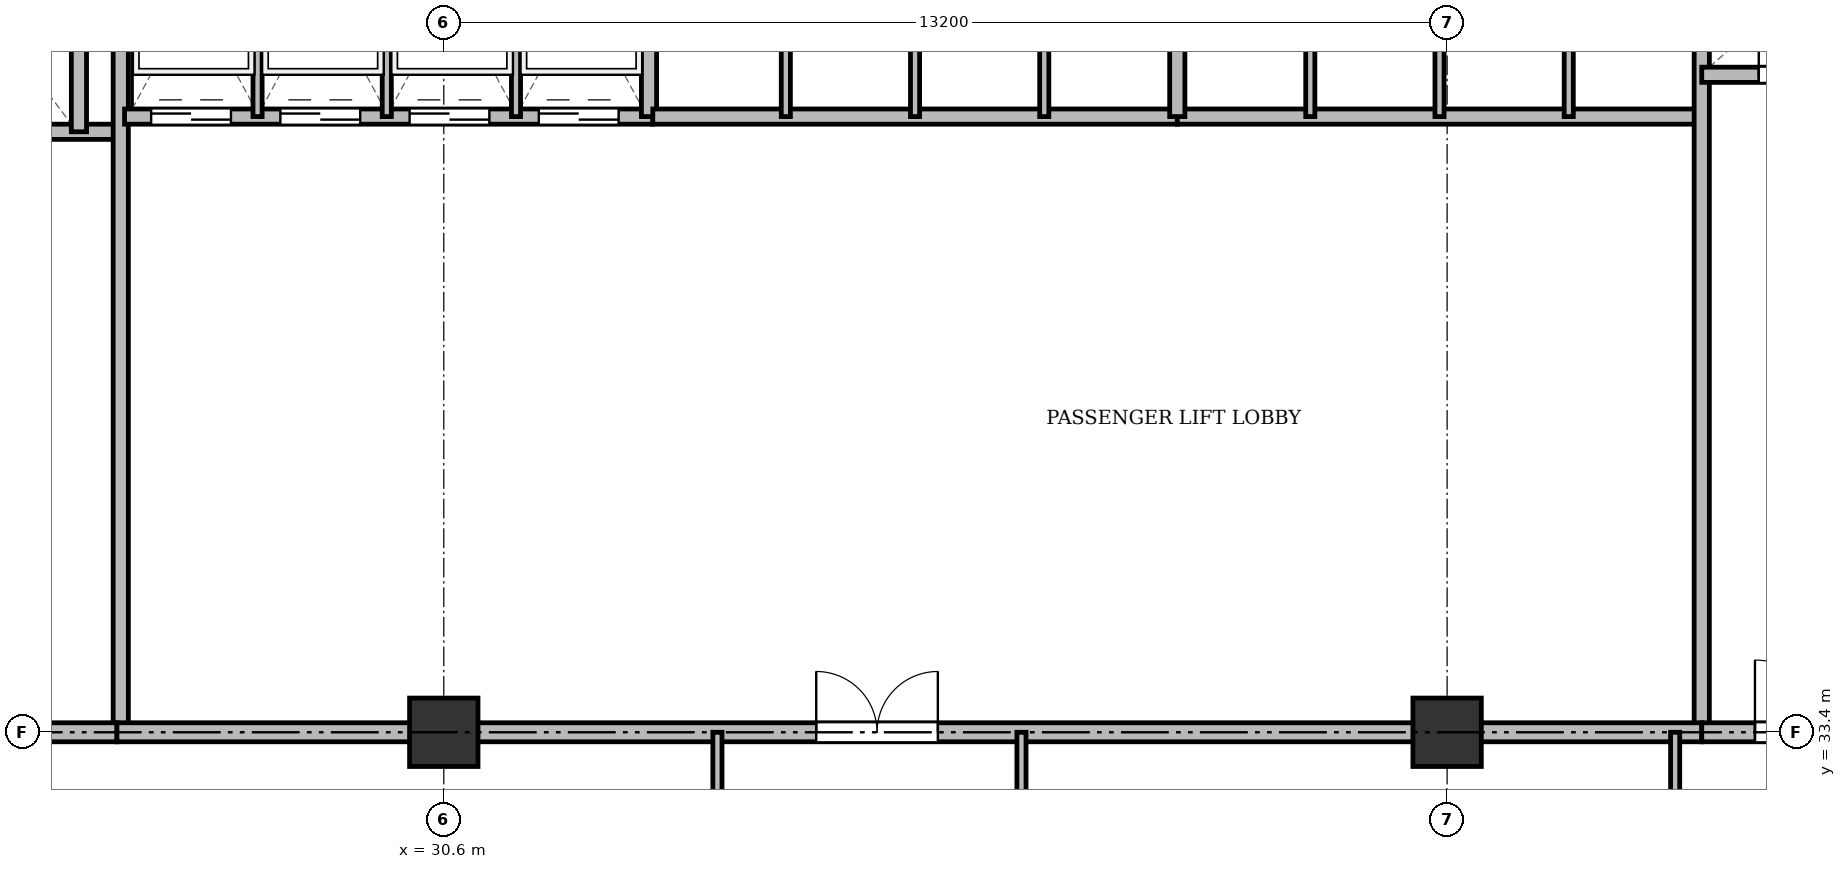
"""IFC4 building model, lengths in metres.
Left out: names, types, materials, properties, quantities, classifications, styles, units other than length and angle.
Written with IfcOpenShell. Run it as: python <this file> out.ifc"""

import sys

from ifc_helpers import new_model, si_unit, direction, frame, frame_2d, origin, origin_2d, place, context, subcontext, project, spatial, rectangle, extrude, source, transform, mapped, element, fill, save


model = new_model("IFC4")
c1 = context("Model", 3, precision=1e-05, world=origin(), true_north=direction((0.0, 1.0)))
c2 = subcontext(c1, "Body", "Model", "MODEL_VIEW")
j1 = project(units=[si_unit("LENGTHUNIT", "METRE"), si_unit("PLANEANGLEUNIT", "RADIAN")], contexts=[c1])
p1 = place(None, origin())
s1 = spatial("IfcSite", under=j1, at=p1, CompositionType="ELEMENT")
p2 = place(p1, origin())
s2 = spatial("IfcBuilding", under=s1, at=p2, CompositionType="ELEMENT")
p3 = place(p2, frame((0.0, 0.0, 52.3)))
s3 = spatial("IfcBuildingStorey", under=s2, at=p3, CompositionType="ELEMENT", Elevation=52.3)
m1 = source(origin(), c2, "Body", "SweptSolid", [
    extrude(rectangle(XDim=0.9, YDim=0.9, at=origin_2d()), origin(), (0.0, 0.0, 1.0), 3.6),
])
for number, where, z_axis, x_axis in (
    (1, (30.6, 33.4, 0.0), (0.0, 0.0, 1.0), (1.0, 0.0, 0.0)),
    (2, (43.8, 33.4, 0.0), (0.0, 0.0, 1.0), (1.0, 0.0, 0.0)),
):
    element("IfcColumn", number, at=place(p3, frame(where, z_axis=z_axis, x_axis=x_axis)), inside=s3, PredefinedType="COLUMN", context=c2, shape_type="MappedRepresentation", body=[
        mapped(m1, transform((0.0, 0.0, 0.0), x_axis=(1.0, 0.0, 0.0), y_axis=(0.0, 1.0, 0.0), z_axis=(0.0, 0.0, 1.0), scale=1.0)),
    ])
p4 = place(p3, frame((19.55, 41.3, 0.0), z_axis=(0.0, 0.0, 1.0), x_axis=(1.0, 0.0, 0.0)))
e3 = element("IfcWall", 3, at=p4, inside=s3, PredefinedType="SOLIDWALL", context=c2, shape_type="SweptSolid", body=[
    extrude(rectangle(XDim=6.75, YDim=0.2, at=frame_2d((3.375, 0.0))), origin(), (0.0, 0.0, 1.0), 3.34),
])
p5 = place(p4, frame((1.7, 0.0, 0.0)))
e4 = element("IfcOpeningElement", 4, at=p5, cuts=e3, PredefinedType="OPENING", context=c2, shape_type="SweptSolid", body=[
    extrude(rectangle(XDim=1.1, YDim=2.15, at=frame_2d((0.55, 1.075))), frame((0.0, 0.11, 0.0), z_axis=(0.0, -1.0, 0.0), x_axis=(1.0, 0.0, 0.0)), (0.0, 0.0, 1.0), 0.22),
])
p6 = place(p4, frame((4.4, 0.0, 0.0)))
e5 = element("IfcOpeningElement", 5, at=p6, cuts=e3, PredefinedType="OPENING", context=c2, shape_type="SweptSolid", body=[
    extrude(rectangle(XDim=1.1, YDim=2.15, at=frame_2d((0.55, 1.075))), frame((0.0, 0.11, 0.0), z_axis=(0.0, -1.0, 0.0), x_axis=(1.0, 0.0, 0.0)), (0.0, 0.0, 1.0), 0.22),
])
p7 = place(p3, frame((25.8, 41.3, 0.0), z_axis=(0.0, 0.0, 1.0), x_axis=(0.0, 1.0, 0.0)))
e6 = element("IfcWall", 6, at=p7, inside=s3, PredefinedType="SOLIDWALL", context=c2, shape_type="SweptSolid", body=[
    extrude(rectangle(XDim=3.4, YDim=0.2, at=frame_2d((1.7, 0.0))), origin(), (0.0, 0.0, 1.0), 3.34),
])
p8 = place(p3, frame((26.35, 33.4, 0.0), z_axis=(0.0, 0.0, 1.0), x_axis=(0.0, 1.0, 0.0)))
e7 = element("IfcWall", 7, at=p8, inside=s3, PredefinedType="SOLIDWALL", context=c2, shape_type="SweptSolid", body=[
    extrude(rectangle(XDim=11.3, YDim=0.2, at=frame_2d((5.65, 0.0))), origin(), (0.0, 0.0, 1.0), 2.69),
])
p9 = place(p3, frame((19.5, 33.4, 0.0), z_axis=(0.0, 0.0, 1.0), x_axis=(1.0, 0.0, 0.0)))
e8 = element("IfcWall", 8, at=p9, inside=s3, PredefinedType="PARTITIONING", context=c2, shape_type="SweptSolid", body=[
    extrude(rectangle(XDim=6.8, YDim=0.25, at=frame_2d((3.4, 0.0))), origin(), (0.0, 0.0, 1.0), 2.69),
])
p10 = place(p9, frame((0.75, 0.0, 0.0)))
e9 = element("IfcOpeningElement", 9, at=p10, cuts=e8, PredefinedType="OPENING", context=c2, shape_type="SweptSolid", body=[
    extrude(rectangle(XDim=1.6, YDim=2.2, at=frame_2d((0.8, 1.1))), frame((0.0, 0.135, 0.0), z_axis=(0.0, -1.0, 0.0), x_axis=(1.0, 0.0, 0.0)), (0.0, 0.0, 1.0), 0.27),
])
p11 = place(p3, frame((26.4, 41.5, 0.0), z_axis=(0.0, 0.0, 1.0), x_axis=(1.0, 0.0, 0.0)))
e10 = element("IfcWall", 10, at=p11, inside=s3, PredefinedType="SOLIDWALL", context=c2, shape_type="SweptSolid", body=[
    extrude(rectangle(XDim=6.95, YDim=0.2, at=frame_2d((3.475, 0.0))), origin(), (0.0, 0.0, 1.0), 3.34),
])
p12 = place(p11, frame((0.35, 0.0, 0.0)))
e11 = element("IfcOpeningElement", 11, at=p12, cuts=e10, PredefinedType="OPENING", context=c2, shape_type="SweptSolid", body=[
    extrude(rectangle(XDim=1.05, YDim=2.15, at=frame_2d((0.525, 1.075))), frame((0.0, 0.11, 0.0), z_axis=(0.0, -1.0, 0.0), x_axis=(1.0, 0.0, 0.0)), (0.0, 0.0, 1.0), 0.22),
])
p13 = place(p11, frame((2.05, 0.0, 0.0)))
e12 = element("IfcOpeningElement", 12, at=p13, cuts=e10, PredefinedType="OPENING", context=c2, shape_type="SweptSolid", body=[
    extrude(rectangle(XDim=1.05, YDim=2.15, at=frame_2d((0.525, 1.075))), frame((0.0, 0.11, 0.0), z_axis=(0.0, -1.0, 0.0), x_axis=(1.0, 0.0, 0.0)), (0.0, 0.0, 1.0), 0.22),
])
p14 = place(p11, frame((3.75, 0.0, 0.0)))
e13 = element("IfcOpeningElement", 13, at=p14, cuts=e10, PredefinedType="OPENING", context=c2, shape_type="SweptSolid", body=[
    extrude(rectangle(XDim=1.05, YDim=2.15, at=frame_2d((0.525, 1.075))), frame((0.0, 0.11, 0.0), z_axis=(0.0, -1.0, 0.0), x_axis=(1.0, 0.0, 0.0)), (0.0, 0.0, 1.0), 0.22),
])
p15 = place(p11, frame((5.45, 0.0, 0.0)))
e14 = element("IfcOpeningElement", 14, at=p15, cuts=e10, PredefinedType="OPENING", context=c2, shape_type="SweptSolid", body=[
    extrude(rectangle(XDim=1.05, YDim=2.15, at=frame_2d((0.525, 1.075))), frame((0.0, 0.11, 0.0), z_axis=(0.0, -1.0, 0.0), x_axis=(1.0, 0.0, 0.0)), (0.0, 0.0, 1.0), 0.22),
])
p16 = place(p3, frame((33.3, 41.5, 0.0), z_axis=(0.0, 0.0, 1.0), x_axis=(0.0, 1.0, 0.0)))
e15 = element("IfcWall", 15, at=p16, inside=s3, PredefinedType="SOLIDWALL", context=c2, shape_type="SweptSolid", body=[
    extrude(rectangle(XDim=3.2, YDim=0.2, at=frame_2d((1.6, 0.0))), origin(), (0.0, 0.0, 1.0), 3.34),
])
for number, where, z_axis, x_axis in (
    (16, (28.15, 41.5, 0.0), (0.0, 0.0, 1.0), (0.0, 1.0, 0.0)),
    (17, (29.85, 41.5, 0.0), (0.0, 0.0, 1.0), (0.0, 1.0, 0.0)),
    (18, (31.55, 41.5, 0.0), (0.0, 0.0, 1.0), (0.0, 1.0, 0.0)),
):
    element("IfcWall", number, at=place(p3, frame(where, z_axis=z_axis, x_axis=x_axis)), inside=s3, PredefinedType="PARTITIONING", context=c2, shape_type="SweptSolid", body=[
        extrude(rectangle(XDim=3.2, YDim=0.12, at=frame_2d((1.6, 0.0))), origin(), (0.0, 0.0, 1.0), 3.34),
    ])
p17 = place(p3, frame((33.35, 41.5, 0.0), z_axis=(0.0, 0.0, 1.0), x_axis=(1.0, 0.0, 0.0)))
e19 = element("IfcWall", 19, at=p17, inside=s3, PredefinedType="SOLIDWALL", context=c2, shape_type="SweptSolid", body=[
    extrude(rectangle(XDim=6.9, YDim=0.2, at=frame_2d((3.45, 0.0))), origin(), (0.0, 0.0, 1.0), 3.34),
])
for number, where, z_axis, x_axis in (
    (20, (35.1, 41.5, 0.0), (0.0, 0.0, 1.0), (0.0, 1.0, 0.0)),
    (21, (36.8, 41.5, 0.0), (0.0, 0.0, 1.0), (0.0, 1.0, 0.0)),
    (22, (38.5, 41.5, 0.0), (0.0, 0.0, 1.0), (0.0, 1.0, 0.0)),
):
    element("IfcWall", number, at=place(p3, frame(where, z_axis=z_axis, x_axis=x_axis)), inside=s3, PredefinedType="PARTITIONING", context=c2, shape_type="SweptSolid", body=[
        extrude(rectangle(XDim=3.2, YDim=0.12, at=frame_2d((1.6, 0.0))), origin(), (0.0, 0.0, 1.0), 3.34),
    ])
p18 = place(p3, frame((40.25, 41.5, 0.0), z_axis=(0.0, 0.0, 1.0), x_axis=(1.0, 0.0, 0.0)))
e23 = element("IfcWall", 23, at=p18, inside=s3, PredefinedType="SOLIDWALL", context=c2, shape_type="SweptSolid", body=[
    extrude(rectangle(XDim=6.9, YDim=0.2, at=frame_2d((3.45, 0.0))), origin(), (0.0, 0.0, 1.0), 2.752),
])
p19 = place(p3, frame((40.25, 41.5, 0.0), z_axis=(0.0, 0.0, 1.0), x_axis=(0.0, 1.0, 0.0)))
e24 = element("IfcWall", 24, at=p19, inside=s3, PredefinedType="SOLIDWALL", context=c2, shape_type="SweptSolid", body=[
    extrude(rectangle(XDim=3.2, YDim=0.2, at=frame_2d((1.6, 0.0))), origin(), (0.0, 0.0, 1.0), 3.34),
])
p20 = place(p3, frame((42.0, 41.5, 0.0), z_axis=(0.0, 0.0, 1.0), x_axis=(0.0, 1.0, 0.0)))
e25 = element("IfcWall", 25, at=p20, inside=s3, PredefinedType="PARTITIONING", context=c2, shape_type="SweptSolid", body=[
    extrude(rectangle(XDim=3.2, YDim=0.12, at=frame_2d((1.6, 0.0))), origin(), (0.0, 0.0, 1.0), 3.34),
])
p21 = place(p3, frame((43.7, 41.5, 0.0), z_axis=(0.0, 0.0, 1.0), x_axis=(0.0, 1.0, 0.0)))
e26 = element("IfcWall", 26, at=p21, inside=s3, PredefinedType="PARTITIONING", context=c2, shape_type="SweptSolid", body=[
    extrude(rectangle(XDim=3.2, YDim=0.12, at=frame_2d((1.6, 0.0))), origin(), (0.0, 0.0, 1.0), 2.752),
])
p22 = place(p3, frame((45.4, 41.5, 0.0), z_axis=(0.0, 0.0, 1.0), x_axis=(0.0, 1.0, 0.0)))
e27 = element("IfcWall", 27, at=p22, inside=s3, PredefinedType="PARTITIONING", context=c2, shape_type="SweptSolid", body=[
    extrude(rectangle(XDim=3.2, YDim=0.12, at=frame_2d((1.6, 0.0))), origin(), (0.0, 0.0, 1.0), 3.34),
])
p23 = place(p3, frame((47.15, 33.4, 0.0), z_axis=(0.0, 0.0, 1.0), x_axis=(0.0, 1.0, 0.0)))
e28 = element("IfcWall", 28, at=p23, inside=s3, PredefinedType="SOLIDWALL", context=c2, shape_type="SweptSolid", body=[
    extrude(rectangle(XDim=11.3, YDim=0.2, at=frame_2d((5.65, 0.0))), origin(), (0.0, 0.0, 1.0), 2.69),
])
p24 = place(p3, frame((26.3, 33.4, 0.0), z_axis=(0.0, 0.0, 1.0), x_axis=(1.0, 0.0, 0.0)))
e29 = element("IfcWall", 29, at=p24, inside=s3, PredefinedType="PARTITIONING", context=c2, shape_type="SweptSolid", body=[
    extrude(rectangle(XDim=20.85, YDim=0.25, at=frame_2d((10.425, 0.0))), origin(), (0.0, 0.0, 1.0), 2.69),
])
p25 = place(p24, frame((9.2, 0.0, 0.0)))
e30 = element("IfcOpeningElement", 30, at=p25, cuts=e29, PredefinedType="OPENING", context=c2, shape_type="SweptSolid", body=[
    extrude(rectangle(XDim=1.6, YDim=2.2, at=frame_2d((0.8, 1.1))), frame((0.0, 0.135, 0.0), z_axis=(0.0, -1.0, 0.0), x_axis=(1.0, 0.0, 0.0)), (0.0, 0.0, 1.0), 0.27),
])
p26 = place(p3, frame((47.15, 42.05, 0.0), z_axis=(0.0, 0.0, 1.0), x_axis=(1.0, 0.0, 0.0)))
e31 = element("IfcWall", 31, at=p26, inside=s3, PredefinedType="SOLIDWALL", context=c2, shape_type="SweptSolid", body=[
    extrude(rectangle(XDim=7.85, YDim=0.2, at=frame_2d((3.925, 0.0))), origin(), (0.0, 0.0, 1.0), 2.752),
])
p27 = place(p26, frame((0.75, 0.0, 0.0)))
e32 = element("IfcOpeningElement", 32, at=p27, cuts=e31, PredefinedType="OPENING", context=c2, shape_type="SweptSolid", body=[
    extrude(rectangle(XDim=0.9, YDim=2.1, at=frame_2d((0.45, 1.05))), frame((0.0, 0.11, 0.0), z_axis=(0.0, -1.0, 0.0), x_axis=(1.0, 0.0, 0.0)), (0.0, 0.0, 1.0), 0.22),
])
p28 = place(p26, frame((3.85, 0.0, 0.0)))
e33 = element("IfcOpeningElement", 33, at=p28, cuts=e31, PredefinedType="OPENING", context=c2, shape_type="SweptSolid", body=[
    extrude(rectangle(XDim=0.9, YDim=2.1, at=frame_2d((0.45, 1.05))), frame((0.0, 0.11, 0.0), z_axis=(0.0, -1.0, 0.0), x_axis=(1.0, 0.0, 0.0)), (0.0, 0.0, 1.0), 0.22),
])
p29 = place(p3, frame((47.15, 33.4, 0.0), z_axis=(0.0, 0.0, 1.0), x_axis=(1.0, 0.0, 0.0)))
e34 = element("IfcWall", 34, at=p29, inside=s3, PredefinedType="PARTITIONING", context=c2, shape_type="SweptSolid", body=[
    extrude(rectangle(XDim=11.15, YDim=0.25, at=frame_2d((5.575, 0.0))), origin(), (0.0, 0.0, 1.0), 2.69),
])
p30 = place(p29, frame((0.7, 0.0, 0.0)))
e35 = element("IfcOpeningElement", 35, at=p30, cuts=e34, PredefinedType="OPENING", context=c2, shape_type="SweptSolid", body=[
    extrude(rectangle(XDim=0.95, YDim=2.15, at=frame_2d((0.475, 1.075))), frame((0.0, 0.135, 0.0), z_axis=(0.0, -1.0, 0.0), x_axis=(1.0, 0.0, 0.0)), (0.0, 0.0, 1.0), 0.27),
])
p31 = place(p29, frame((6.0, 0.0, 0.0)))
e36 = element("IfcOpeningElement", 36, at=p31, cuts=e34, PredefinedType="OPENING", context=c2, shape_type="SweptSolid", body=[
    extrude(rectangle(XDim=1.2, YDim=2.15, at=frame_2d((0.6, 1.075))), frame((0.0, 0.135, 0.0), z_axis=(0.0, -1.0, 0.0), x_axis=(1.0, 0.0, 0.0)), (0.0, 0.0, 1.0), 0.27),
])
for number, where, z_axis, x_axis in (
    (37, (34.2, 29.8, 0.0), (0.0, 0.0, 1.0), (0.0, 1.0, 0.0)),
    (38, (38.2, 29.8, 0.0), (0.0, 0.0, 1.0), (0.0, 1.0, 0.0)),
    (39, (46.8, 29.8, 0.0), (0.0, 0.0, 1.0), (0.0, 1.0, 0.0)),
):
    element("IfcWall", number, at=place(p3, frame(where, z_axis=z_axis, x_axis=x_axis)), inside=s3, PredefinedType="PARTITIONING", context=c2, shape_type="SweptSolid", body=[
        extrude(rectangle(XDim=3.6, YDim=0.12, at=frame_2d((1.8, 0.0))), origin(), (0.0, 0.0, 1.0), 2.69),
    ])
m2 = source(origin(), c2, "Body", "SweptSolid", [
    extrude(rectangle(XDim=1.05, YDim=2.15, at=frame_2d((0.525, 1.075))), frame((0.0, 0.025, 0.0), z_axis=(0.0, -1.0, 0.0), x_axis=(1.0, 0.0, 0.0)), (0.0, 0.0, 1.0), 0.05),
])
p32 = place(p12, origin())
e40 = element("IfcDoor", 40, at=p32, inside=s3, OperationType="DOUBLE_DOOR_SLIDING", PredefinedType="DOOR", context=c2, shape_type="MappedRepresentation", body=[
    mapped(m2, transform((0.0, 0.0, 0.0), x_axis=(1.0, 0.0, 0.0), y_axis=(0.0, 1.0, 0.0), z_axis=(0.0, 0.0, 1.0), scale=1.0)),
])
fill(e11, e40)
p33 = place(p13, origin())
e41 = element("IfcDoor", 41, at=p33, inside=s3, OperationType="DOUBLE_DOOR_SLIDING", PredefinedType="DOOR", context=c2, shape_type="MappedRepresentation", body=[
    mapped(m2, transform((0.0, 0.0, 0.0), x_axis=(1.0, 0.0, 0.0), y_axis=(0.0, 1.0, 0.0), z_axis=(0.0, 0.0, 1.0), scale=1.0)),
])
fill(e12, e41)
p34 = place(p14, origin())
e42 = element("IfcDoor", 42, at=p34, inside=s3, OperationType="DOUBLE_DOOR_SLIDING", PredefinedType="DOOR", context=c2, shape_type="MappedRepresentation", body=[
    mapped(m2, transform((0.0, 0.0, 0.0), x_axis=(1.0, 0.0, 0.0), y_axis=(0.0, 1.0, 0.0), z_axis=(0.0, 0.0, 1.0), scale=1.0)),
])
fill(e13, e42)
p35 = place(p15, origin())
e43 = element("IfcDoor", 43, at=p35, inside=s3, OperationType="DOUBLE_DOOR_SLIDING", PredefinedType="DOOR", context=c2, shape_type="MappedRepresentation", body=[
    mapped(m2, transform((0.0, 0.0, 0.0), x_axis=(1.0, 0.0, 0.0), y_axis=(0.0, 1.0, 0.0), z_axis=(0.0, 0.0, 1.0), scale=1.0)),
])
fill(e14, e43)
m3 = source(origin(), c2, "Body", "SweptSolid", [
    extrude(rectangle(XDim=1.6, YDim=2.2, at=frame_2d((0.8, 1.1))), frame((0.0, 0.025, 0.0), z_axis=(0.0, -1.0, 0.0), x_axis=(1.0, 0.0, 0.0)), (0.0, 0.0, 1.0), 0.05),
])
p36 = place(p25, origin())
e44 = element("IfcDoor", 44, at=p36, inside=s3, OperationType="DOUBLE_DOOR_SINGLE_SWING", PredefinedType="DOOR", context=c2, shape_type="MappedRepresentation", body=[
    mapped(m3, transform((0.0, 0.0, 0.0), x_axis=(1.0, 0.0, 0.0), y_axis=(0.0, 1.0, 0.0), z_axis=(0.0, 0.0, 1.0), scale=1.0)),
])
fill(e30, e44)
m4 = source(origin(), c2, "Body", "SweptSolid", [
    extrude(rectangle(XDim=0.9, YDim=2.1, at=frame_2d((0.45, 1.05))), frame((0.0, 0.025, 0.0), z_axis=(0.0, -1.0, 0.0), x_axis=(1.0, 0.0, 0.0)), (0.0, 0.0, 1.0), 0.05),
])
p37 = place(p27, origin())
e45 = element("IfcDoor", 45, at=p37, inside=s3, OperationType="SINGLE_SWING_LEFT", PredefinedType="DOOR", context=c2, shape_type="MappedRepresentation", body=[
    mapped(m4, transform((0.0, 0.0, 0.0), x_axis=(1.0, 0.0, 0.0), y_axis=(0.0, 1.0, 0.0), z_axis=(0.0, 0.0, 1.0), scale=1.0)),
])
fill(e32, e45)
m5 = source(origin(), c2, "Body", "SweptSolid", [
    extrude(rectangle(XDim=0.95, YDim=2.15, at=frame_2d((0.475, 1.075))), frame((0.0, 0.025, 0.0), z_axis=(0.0, -1.0, 0.0), x_axis=(1.0, 0.0, 0.0)), (0.0, 0.0, 1.0), 0.05),
])
p38 = place(p30, origin())
e46 = element("IfcDoor", 46, at=p38, inside=s3, OperationType="SINGLE_SWING_LEFT", PredefinedType="DOOR", context=c2, shape_type="MappedRepresentation", body=[
    mapped(m5, transform((0.0, 0.0, 0.0), x_axis=(1.0, 0.0, 0.0), y_axis=(0.0, 1.0, 0.0), z_axis=(0.0, 0.0, 1.0), scale=1.0)),
])
fill(e35, e46)
save(model, sys.argv[1])
